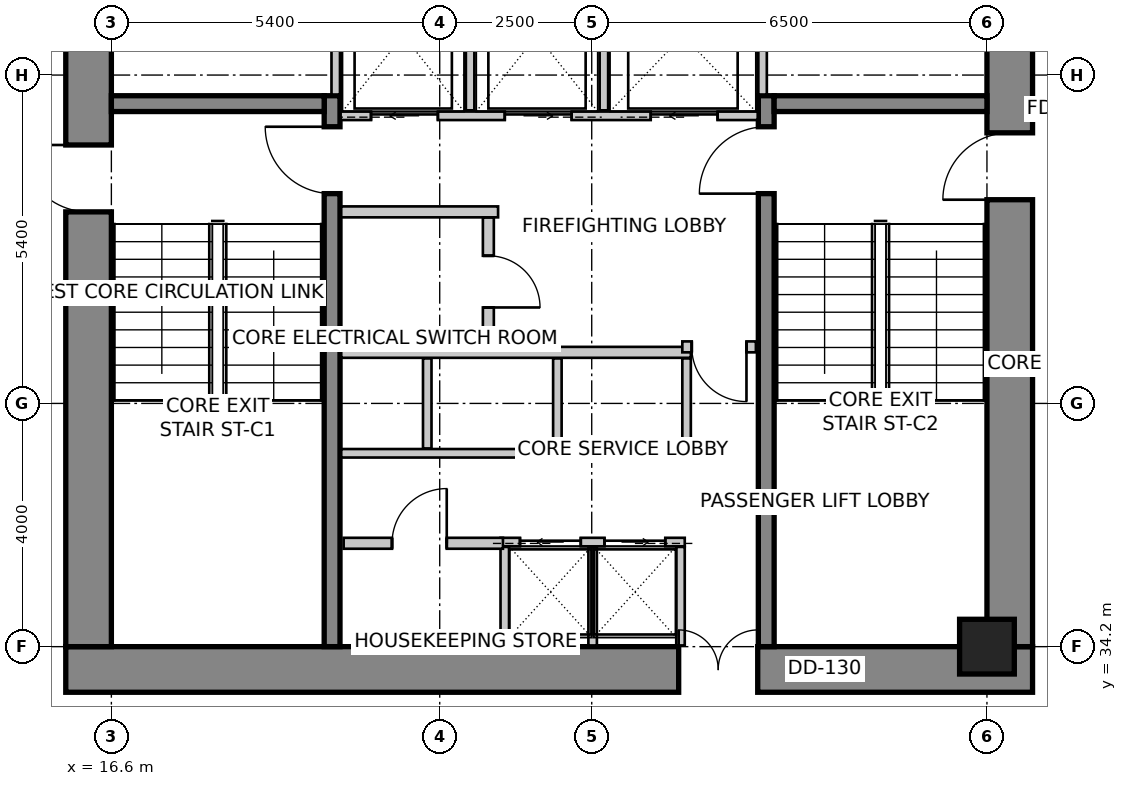
"""IFC4 building model, lengths in metres.
Left out: names, types, materials, properties, quantities, classifications, styles, units other than length and angle.
Written with IfcOpenShell. Run it as: python <this file> out.ifc"""

import sys

from ifc_helpers import new_model, si_unit, direction, frame, frame_2d, origin, origin_2d, place, context, subcontext, project, spatial, rectangle, extrude, source, transform, mapped, element, fill, save


model = new_model("IFC4")
c1 = context("Model", 3, precision=1e-05, world=origin(), true_north=direction((0.0, 1.0)))
c2 = subcontext(c1, "Body", "Model", "MODEL_VIEW")
j1 = project(units=[si_unit("LENGTHUNIT", "METRE"), si_unit("PLANEANGLEUNIT", "RADIAN")], contexts=[c1])
p1 = place(None, origin())
s1 = spatial("IfcSite", under=j1, at=p1, CompositionType="ELEMENT")
p2 = place(p1, origin())
s2 = spatial("IfcBuilding", under=s1, at=p2, CompositionType="ELEMENT")
p3 = place(p2, frame((0.0, 0.0, 161.0)))
s3 = spatial("IfcBuildingStorey", under=s2, at=p3, CompositionType="ELEMENT", Elevation=161.0)
p4 = place(p3, frame((15.85, 33.825, 0.0), z_axis=(0.0, 0.0, 1.0), x_axis=(1.0, 0.0, 0.0)))
e1 = element("IfcWall", 1, at=p4, inside=s3, PredefinedType="SHEAR", context=c2, shape_type="SweptSolid", body=[
    extrude(rectangle(XDim=15.9, YDim=0.75, at=frame_2d((7.95, 0.0))), origin(), (0.0, 0.0, 1.0), 3.6),
])
m1 = source(origin(), c2, "Body", "SweptSolid", [
    extrude(rectangle(XDim=1.3, YDim=2.15, at=frame_2d((0.65, 1.075))), frame((0.0, 0.385, 0.0), z_axis=(0.0, -1.0, 0.0), x_axis=(1.0, 0.0, 0.0)), (0.0, 0.0, 1.0), 0.77),
])
p5 = place(p4, frame((10.08, 0.0, 0.0)))
e2 = element("IfcOpeningElement", 2, at=p5, cuts=e1, PredefinedType="OPENING", context=c2, shape_type="MappedRepresentation", body=[
    mapped(m1, transform((0.0, 0.0, 0.0), scale=1.0)),
])
p6 = place(p3, frame((16.225, 34.2, 0.0), z_axis=(0.0, 0.0, 1.0), x_axis=(0.0, 1.0, 0.0)))
e3 = element("IfcWall", 3, at=p6, inside=s3, PredefinedType="SHEAR", context=c2, shape_type="SweptSolid", body=[
    extrude(rectangle(XDim=11.4, YDim=0.75, at=frame_2d((5.7, 0.0))), origin(), (0.0, 0.0, 1.0), 3.6),
])
m2 = source(origin(), c2, "Body", "SweptSolid", [
    extrude(rectangle(XDim=1.1, YDim=2.15, at=frame_2d((0.55, 1.075))), frame((0.0, 0.385, 0.0), z_axis=(0.0, -1.0, 0.0), x_axis=(1.0, 0.0, 0.0)), (0.0, 0.0, 1.0), 0.77),
])
p7 = place(p6, frame((7.15, 0.0, 0.0)))
e4 = element("IfcOpeningElement", 4, at=p7, cuts=e3, PredefinedType="OPENING", context=c2, shape_type="MappedRepresentation", body=[
    mapped(m2, transform((0.0, 0.0, 0.0), scale=1.0)),
])
p8 = place(p3, frame((31.375, 34.2, 0.0), z_axis=(0.0, 0.0, 1.0), x_axis=(0.0, 1.0, 0.0)))
e5 = element("IfcWall", 5, at=p8, inside=s3, PredefinedType="SHEAR", context=c2, shape_type="SweptSolid", body=[
    extrude(rectangle(XDim=11.4, YDim=0.75, at=frame_2d((5.7, 0.0))), origin(), (0.0, 0.0, 1.0), 3.6),
])
p9 = place(p8, frame((7.35, 0.0, 0.0)))
e6 = element("IfcOpeningElement", 6, at=p9, cuts=e5, PredefinedType="OPENING", context=c2, shape_type="MappedRepresentation", body=[
    mapped(m2, transform((0.0, 0.0, 0.0), scale=1.0)),
])
p10 = place(p3, frame((20.23, 34.2, 0.0), z_axis=(0.0, 0.0, 1.0), x_axis=(0.0, 1.0, 0.0)))
e7 = element("IfcWall", 7, at=p10, inside=s3, PredefinedType="SHEAR", context=c2, shape_type="SweptSolid", body=[
    extrude(rectangle(XDim=9.06, YDim=0.26, at=frame_2d((4.53, 0.0))), origin(), (0.0, 0.0, 1.0), 3.6),
])
m3 = source(origin(), c2, "Body", "SweptSolid", [
    extrude(rectangle(XDim=1.1, YDim=2.15, at=frame_2d((0.55, 1.075))), frame((0.0, 0.14, 0.0), z_axis=(0.0, -1.0, 0.0), x_axis=(1.0, 0.0, 0.0)), (0.0, 0.0, 1.0), 0.28),
])
p11 = place(p10, frame((7.45, 0.0, 0.0)))
e8 = element("IfcOpeningElement", 8, at=p11, cuts=e7, PredefinedType="OPENING", context=c2, shape_type="MappedRepresentation", body=[
    mapped(m3, transform((0.0, 0.0, 0.0), scale=1.0)),
])
p12 = place(p3, frame((27.37, 34.2, 0.0), z_axis=(0.0, 0.0, 1.0), x_axis=(0.0, 1.0, 0.0)))
e9 = element("IfcWall", 9, at=p12, inside=s3, PredefinedType="SHEAR", context=c2, shape_type="SweptSolid", body=[
    extrude(rectangle(XDim=9.06, YDim=0.26, at=frame_2d((4.53, 0.0))), origin(), (0.0, 0.0, 1.0), 3.6),
])
p13 = place(p12, frame((7.45, 0.0, 0.0)))
e10 = element("IfcOpeningElement", 10, at=p13, cuts=e9, PredefinedType="OPENING", context=c2, shape_type="MappedRepresentation", body=[
    mapped(m3, transform((0.0, 0.0, 0.0), scale=1.0)),
])
for number, where, z_axis, x_axis in (
    (11, (16.6, 43.13, 0.0), (0.0, 0.0, 1.0), (1.0, 0.0, 0.0)),
    (12, (27.5, 43.13, 0.0), (0.0, 0.0, 1.0), (1.0, 0.0, 0.0)),
):
    element("IfcWall", number, at=place(p3, frame(where, z_axis=z_axis, x_axis=x_axis)), inside=s3, PredefinedType="SHEAR", context=c2, shape_type="SweptSolid", body=[
        extrude(rectangle(XDim=3.5, YDim=0.26, at=frame_2d((1.75, 0.0))), origin(), (0.0, 0.0, 1.0), 3.6),
    ])
m4 = source(origin(), c2, "Body", "SweptSolid", [
    extrude(rectangle(XDim=0.9, YDim=0.9, at=origin_2d()), origin(), (0.0, 0.0, 1.0), 3.6),
])
p14 = place(p3, frame((31.0, 34.2, 0.0), z_axis=(0.0, 0.0, 1.0), x_axis=(1.0, 0.0, 0.0)))
e13 = element("IfcColumn", 13, at=p14, inside=s3, PredefinedType="COLUMN", context=c2, shape_type="MappedRepresentation", body=[
    mapped(m4, transform((0.0, 0.0, 0.0), scale=1.0)),
])
p15 = place(p3, frame((20.37, 42.93, 0.0), z_axis=(0.0, 0.0, 1.0), x_axis=(1.0, 0.0, 0.0)))
e14 = element("IfcWall", 14, at=p15, inside=s3, PredefinedType="SOLIDWALL", context=c2, shape_type="SweptSolid", body=[
    extrude(rectangle(XDim=6.86, YDim=0.14, at=frame_2d((3.43, 0.0))), origin(), (0.0, 0.0, 1.0), 3.35),
])
m5 = source(origin(), c2, "Body", "SweptSolid", [
    extrude(rectangle(XDim=1.1, YDim=2.15, at=frame_2d((0.55, 1.075))), frame((0.0, 0.08, 0.0), z_axis=(0.0, -1.0, 0.0), x_axis=(1.0, 0.0, 0.0)), (0.0, 0.0, 1.0), 0.16),
])
p16 = place(p15, frame((0.5, 0.0, 0.0)))
e15 = element("IfcOpeningElement", 15, at=p16, cuts=e14, PredefinedType="OPENING", context=c2, shape_type="MappedRepresentation", body=[
    mapped(m5, transform((0.0, 0.0, 0.0), scale=1.0)),
])
p17 = place(p15, frame((2.7, 0.0, 0.0)))
e16 = element("IfcOpeningElement", 16, at=p17, cuts=e14, PredefinedType="OPENING", context=c2, shape_type="MappedRepresentation", body=[
    mapped(m5, transform((0.0, 0.0, 0.0), scale=1.0)),
])
p18 = place(p15, frame((5.1, 0.0, 0.0)))
e17 = element("IfcOpeningElement", 17, at=p18, cuts=e14, PredefinedType="OPENING", context=c2, shape_type="MappedRepresentation", body=[
    mapped(m5, transform((0.0, 0.0, 0.0), scale=1.0)),
])
for number, where, z_axis, x_axis in (
    (18, (20.29, 43.28, 0.0), (0.0, 0.0, 1.0), (0.0, 1.0, 0.0)),
    (19, (27.31, 43.28, 0.0), (0.0, 0.0, 1.0), (0.0, 1.0, 0.0)),
):
    element("IfcWall", number, at=place(p3, frame(where, z_axis=z_axis, x_axis=x_axis)), inside=s3, PredefinedType="SOLIDWALL", context=c2, shape_type="SweptSolid", body=[
        extrude(rectangle(XDim=2.3, YDim=0.14, at=frame_2d((1.15, 0.0))), origin(), (0.0, 0.0, 1.0), 3.35),
    ])
for number, where, z_axis, x_axis in (
    (20, (22.5, 43.02, 0.0), (0.0, 0.0, 1.0), (0.0, 1.0, 0.0)),
    (21, (24.7, 43.02, 0.0), (0.0, 0.0, 1.0), (0.0, 1.0, 0.0)),
):
    element("IfcWall", number, at=place(p3, frame(where, z_axis=z_axis, x_axis=x_axis)), inside=s3, PredefinedType="SOLIDWALL", context=c2, shape_type="SweptSolid", body=[
        extrude(rectangle(XDim=2.56, YDim=0.14, at=frame_2d((1.28, 0.0))), origin(), (0.0, 0.0, 1.0), 3.35),
    ])
p19 = place(p3, frame((23.0, 35.92, 0.0), z_axis=(0.0, 0.0, 1.0), x_axis=(1.0, 0.0, 0.0)))
e22 = element("IfcWall", 22, at=p19, inside=s3, PredefinedType="SOLIDWALL", context=c2, shape_type="SweptSolid", body=[
    extrude(rectangle(XDim=3.03, YDim=0.14, at=frame_2d((1.515, 0.0))), origin(), (0.0, 0.0, 1.0), 3.35),
])
m6 = source(origin(), c2, "Body", "SweptSolid", [
    extrude(rectangle(XDim=1.0, YDim=2.15, at=frame_2d((0.5, 1.075))), frame((0.0, 0.08, 0.0), z_axis=(0.0, -1.0, 0.0), x_axis=(1.0, 0.0, 0.0)), (0.0, 0.0, 1.0), 0.16),
])
p20 = place(p19, frame((0.32, 0.0, 0.0)))
e23 = element("IfcOpeningElement", 23, at=p20, cuts=e22, PredefinedType="OPENING", context=c2, shape_type="MappedRepresentation", body=[
    mapped(m6, transform((0.0, 0.0, 0.0), scale=1.0)),
])
p21 = place(p19, frame((1.71, 0.0, 0.0)))
e24 = element("IfcOpeningElement", 24, at=p21, cuts=e22, PredefinedType="OPENING", context=c2, shape_type="MappedRepresentation", body=[
    mapped(m6, transform((0.0, 0.0, 0.0), scale=1.0)),
])
for number, where, z_axis, x_axis in (
    (25, (25.96, 34.22, 0.0), (0.0, 0.0, 1.0), (0.0, 1.0, 0.0)),
    (26, (23.07, 34.22, 0.0), (0.0, 0.0, 1.0), (0.0, 1.0, 0.0)),
    (27, (24.515, 34.22, 0.0), (0.0, 0.0, 1.0), (0.0, 1.0, 0.0)),
):
    element("IfcWall", number, at=place(p3, frame(where, z_axis=z_axis, x_axis=x_axis)), inside=s3, PredefinedType="SOLIDWALL", context=c2, shape_type="SweptSolid", body=[
        extrude(rectangle(XDim=1.62, YDim=0.14, at=frame_2d((0.81, 0.0))), origin(), (0.0, 0.0, 1.0), 2.642),
    ])
p22 = place(p3, frame((20.38, 37.38, 0.0), z_axis=(0.0, 0.0, 1.0), x_axis=(1.0, 0.0, 0.0)))
e28 = element("IfcWall", 28, at=p22, inside=s3, PredefinedType="SOLIDWALL", context=c2, shape_type="SweptSolid", body=[
    extrude(rectangle(XDim=5.75, YDim=0.14, at=frame_2d((2.875, 0.0))), origin(), (0.0, 0.0, 1.0), 3.35),
])
p23 = place(p3, frame((20.38, 39.04, 0.0), z_axis=(0.0, 0.0, 1.0), x_axis=(1.0, 0.0, 0.0)))
e29 = element("IfcWall", 29, at=p23, inside=s3, PredefinedType="SOLIDWALL", context=c2, shape_type="SweptSolid", body=[
    extrude(rectangle(XDim=5.75, YDim=0.18, at=frame_2d((2.875, 0.0))), origin(), (0.0, 0.0, 1.0), 3.35),
])
for number, where, z_axis, x_axis in (
    (30, (26.06, 37.46, 0.0), (0.0, 0.0, 1.0), (0.0, 1.0, 0.0)),
    (31, (21.795, 37.46, 0.0), (0.0, 0.0, 1.0), (0.0, 1.0, 0.0)),
    (32, (23.935, 37.46, 0.0), (0.0, 0.0, 1.0), (0.0, 1.0, 0.0)),
):
    element("IfcWall", number, at=place(p3, frame(where, z_axis=z_axis, x_axis=x_axis)), inside=s3, PredefinedType="SOLIDWALL", context=c2, shape_type="SweptSolid", body=[
        extrude(rectangle(XDim=1.48, YDim=0.14, at=frame_2d((0.74, 0.0))), origin(), (0.0, 0.0, 1.0), 3.35),
    ])
p24 = place(p3, frame((22.96, 41.35, 0.0), z_axis=(0.0, 0.0, 1.0), x_axis=(-1.0, 0.0, 0.0)))
e33 = element("IfcWall", 33, at=p24, inside=s3, PredefinedType="PARTITIONING", context=c2, shape_type="SweptSolid", body=[
    extrude(rectangle(XDim=2.58, YDim=0.18, at=frame_2d((1.29, 0.0))), origin(), (0.0, 0.0, 1.0), 3.35),
])
p25 = place(p3, frame((22.8, 41.256, 0.0), z_axis=(0.0, 0.0, 1.0), x_axis=(0.0, -1.0, 0.0)))
e34 = element("IfcWall", 34, at=p25, inside=s3, PredefinedType="PARTITIONING", context=c2, shape_type="SweptSolid", body=[
    extrude(rectangle(XDim=2.106, YDim=0.18, at=frame_2d((1.053, 0.0))), origin(), (0.0, 0.0, 1.0), 3.35),
])
m7 = source(origin(), c2, "Body", "SweptSolid", [
    extrude(rectangle(XDim=0.85, YDim=2.15, at=frame_2d((0.425, 1.075))), frame((0.0, 0.1, 0.0), z_axis=(0.0, -1.0, 0.0), x_axis=(1.0, 0.0, 0.0)), (0.0, 0.0, 1.0), 0.2),
])
p26 = place(p25, frame((0.628, 0.0, 0.0)))
e35 = element("IfcOpeningElement", 35, at=p26, cuts=e34, PredefinedType="OPENING", context=c2, shape_type="MappedRepresentation", body=[
    mapped(m7, transform((0.0, 0.0, 0.0), scale=1.0)),
])
p27 = place(p3, frame((27.2, 39.13, 0.0), z_axis=(0.0, 0.0, 1.0), x_axis=(-1.0, 0.0, 0.0)))
e36 = element("IfcWall", 36, at=p27, inside=s3, PredefinedType="PARTITIONING", context=c2, shape_type="SweptSolid", body=[
    extrude(rectangle(XDim=1.21, YDim=0.18, at=frame_2d((0.605, 0.0))), origin(), (0.0, 0.0, 1.0), 3.35),
])
m8 = source(origin(), c2, "Body", "SweptSolid", [
    extrude(rectangle(XDim=0.9, YDim=2.15, at=frame_2d((0.45, 1.075))), frame((0.0, 0.1, 0.0), z_axis=(0.0, -1.0, 0.0), x_axis=(1.0, 0.0, 0.0)), (0.0, 0.0, 1.0), 0.2),
])
p28 = place(p27, frame((0.155, 0.0, 0.0)))
e37 = element("IfcOpeningElement", 37, at=p28, cuts=e36, PredefinedType="OPENING", context=c2, shape_type="MappedRepresentation", body=[
    mapped(m8, transform((0.0, 0.0, 0.0), scale=1.0)),
])
p29 = place(p3, frame((20.42, 35.9, 0.0), z_axis=(0.0, 0.0, 1.0), x_axis=(1.0, 0.0, 0.0)))
e38 = element("IfcWall", 38, at=p29, inside=s3, PredefinedType="PARTITIONING", context=c2, shape_type="SweptSolid", body=[
    extrude(rectangle(XDim=2.62, YDim=0.18, at=frame_2d((1.31, 0.0))), origin(), (0.0, 0.0, 1.0), 3.35),
])
p30 = place(p29, frame((0.796, 0.0, 0.0)))
e39 = element("IfcOpeningElement", 39, at=p30, cuts=e38, PredefinedType="OPENING", context=c2, shape_type="MappedRepresentation", body=[
    mapped(m8, transform((0.0, 0.0, 0.0), scale=1.0)),
])
m9 = source(origin(), c2, "Body", "SweptSolid", [
    extrude(rectangle(XDim=1.1, YDim=2.15, at=frame_2d((0.55, 1.075))), frame((0.0, 0.025, 0.0), z_axis=(0.0, -1.0, 0.0), x_axis=(1.0, 0.0, 0.0)), (0.0, 0.0, 1.0), 0.05),
])
p31 = place(p16, origin())
e40 = element("IfcDoor", 40, at=p31, inside=s3, OperationType="SLIDING_TO_LEFT", PredefinedType="DOOR", context=c2, shape_type="MappedRepresentation", body=[
    mapped(m9, transform((0.0, 0.0, 0.0), scale=1.0)),
])
fill(e15, e40)
p32 = place(p17, origin())
e41 = element("IfcDoor", 41, at=p32, inside=s3, OperationType="SLIDING_TO_RIGHT", PredefinedType="DOOR", context=c2, shape_type="MappedRepresentation", body=[
    mapped(m9, transform((0.0, 0.0, 0.0), scale=1.0)),
])
fill(e16, e41)
m10 = source(origin(), c2, "Body", "SweptSolid", [
    extrude(rectangle(XDim=1.1, YDim=2.15, at=frame_2d((0.55, 1.075))), frame((0.0, 0.025, 0.0), z_axis=(0.0, -1.0, 0.0), x_axis=(1.0, 0.0, 0.0)), (0.0, 0.0, 1.0), 0.05),
])
p33 = place(p18, origin())
e42 = element("IfcDoor", 42, at=p33, inside=s3, OperationType="SLIDING_TO_LEFT", PredefinedType="DOOR", context=c2, shape_type="MappedRepresentation", body=[
    mapped(m10, transform((0.0, 0.0, 0.0), scale=1.0)),
])
fill(e17, e42)
m11 = source(origin(), c2, "Body", "SweptSolid", [
    extrude(rectangle(XDim=1.0, YDim=2.15, at=frame_2d((0.5, 1.075))), frame((0.0, 0.025, 0.0), z_axis=(0.0, -1.0, 0.0), x_axis=(1.0, 0.0, 0.0)), (0.0, 0.0, 1.0), 0.05),
])
p34 = place(p20, origin())
e43 = element("IfcDoor", 43, at=p34, inside=s3, OperationType="SLIDING_TO_LEFT", PredefinedType="DOOR", context=c2, shape_type="MappedRepresentation", body=[
    mapped(m11, transform((0.0, 0.0, 0.0), scale=1.0)),
])
fill(e23, e43)
p35 = place(p21, origin())
e44 = element("IfcDoor", 44, at=p35, inside=s3, OperationType="SLIDING_TO_RIGHT", PredefinedType="DOOR", context=c2, shape_type="MappedRepresentation", body=[
    mapped(m11, transform((0.0, 0.0, 0.0), scale=1.0)),
])
fill(e24, e44)
m12 = source(origin(), c2, "Body", "SweptSolid", [
    extrude(rectangle(XDim=1.1, YDim=2.15, at=frame_2d((0.55, 1.075))), frame((0.0, 0.025, 0.0), z_axis=(0.0, -1.0, 0.0), x_axis=(1.0, 0.0, 0.0)), (0.0, 0.0, 1.0), 0.05),
])
p36 = place(p11, origin())
e45 = element("IfcDoor", 45, at=p36, inside=s3, OperationType="SINGLE_SWING_RIGHT", PredefinedType="DOOR", context=c2, shape_type="MappedRepresentation", body=[
    mapped(m12, transform((0.0, 0.0, 0.0), scale=1.0)),
])
fill(e8, e45)
p37 = place(p13, origin())
e46 = element("IfcDoor", 46, at=p37, inside=s3, OperationType="SINGLE_SWING_LEFT", PredefinedType="DOOR", context=c2, shape_type="MappedRepresentation", body=[
    mapped(m12, transform((0.0, 0.0, 0.0), scale=1.0)),
])
fill(e10, e46)
p38 = place(p7, origin())
e47 = element("IfcDoor", 47, at=p38, inside=s3, OperationType="SINGLE_SWING_RIGHT", PredefinedType="DOOR", context=c2, shape_type="MappedRepresentation", body=[
    mapped(m12, transform((0.0, 0.0, 0.0), scale=1.0)),
])
fill(e4, e47)
p39 = place(p9, origin())
e48 = element("IfcDoor", 48, at=p39, inside=s3, OperationType="SINGLE_SWING_LEFT", PredefinedType="DOOR", context=c2, shape_type="MappedRepresentation", body=[
    mapped(m12, transform((0.0, 0.0, 0.0), scale=1.0)),
])
fill(e6, e48)
m13 = source(origin(), c2, "Body", "SweptSolid", [
    extrude(rectangle(XDim=1.3, YDim=2.15, at=frame_2d((0.65, 1.075))), frame((0.0, 0.025, 0.0), z_axis=(0.0, -1.0, 0.0), x_axis=(1.0, 0.0, 0.0)), (0.0, 0.0, 1.0), 0.05),
])
p40 = place(p5, origin())
e49 = element("IfcDoor", 49, at=p40, inside=s3, OperationType="DOUBLE_DOOR_SINGLE_SWING", PredefinedType="DOOR", context=c2, shape_type="MappedRepresentation", body=[
    mapped(m13, transform((0.0, 0.0, 0.0), scale=1.0)),
])
fill(e2, e49)
m14 = source(origin(), c2, "Body", "SweptSolid", [
    extrude(rectangle(XDim=0.85, YDim=2.15, at=frame_2d((0.425, 1.075))), frame((0.0, 0.025, 0.0), z_axis=(0.0, -1.0, 0.0), x_axis=(1.0, 0.0, 0.0)), (0.0, 0.0, 1.0), 0.05),
])
p41 = place(p26, origin())
e50 = element("IfcDoor", 50, at=p41, inside=s3, OperationType="SINGLE_SWING_RIGHT", PredefinedType="DOOR", context=c2, shape_type="MappedRepresentation", body=[
    mapped(m14, transform((0.0, 0.0, 0.0), scale=1.0)),
])
fill(e35, e50)
m15 = source(origin(), c2, "Body", "SweptSolid", [
    extrude(rectangle(XDim=0.9, YDim=2.15, at=frame_2d((0.45, 1.075))), frame((0.0, 0.025, 0.0), z_axis=(0.0, -1.0, 0.0), x_axis=(1.0, 0.0, 0.0)), (0.0, 0.0, 1.0), 0.05),
])
p42 = place(p28, origin())
e51 = element("IfcDoor", 51, at=p42, inside=s3, OperationType="SINGLE_SWING_LEFT", PredefinedType="DOOR", context=c2, shape_type="MappedRepresentation", body=[
    mapped(m15, transform((0.0, 0.0, 0.0), scale=1.0)),
])
fill(e37, e51)
p43 = place(p30, origin())
e52 = element("IfcDoor", 52, at=p43, inside=s3, OperationType="SINGLE_SWING_RIGHT", PredefinedType="DOOR", context=c2, shape_type="MappedRepresentation", body=[
    mapped(m15, transform((0.0, 0.0, 0.0), scale=1.0)),
])
fill(e39, e52)
save(model, sys.argv[1])
